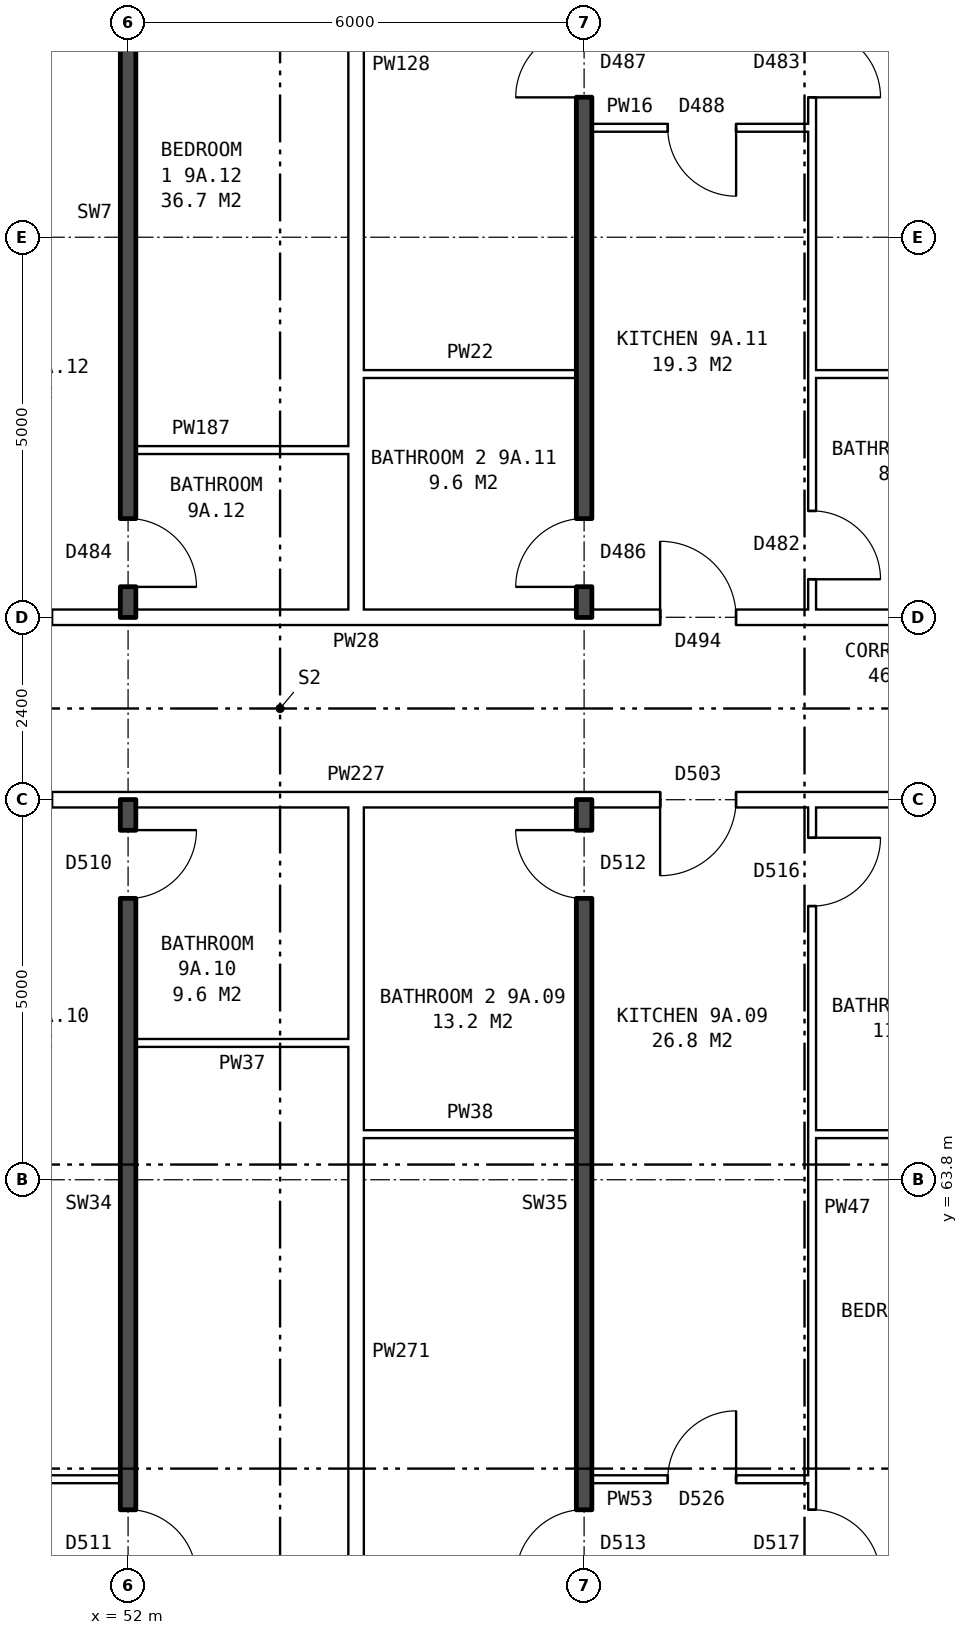
"""IFC4 building model, lengths in metres.
Left out: names, types, materials, properties, quantities, classifications, styles, units other than length and angle.
Written with IfcOpenShell. Run it as: python <this file> out.ifc"""

import sys

from ifc_helpers import new_model, si_unit, direction, frame, frame_2d, origin, place, context, subcontext, project, spatial, rectangle, extrude, element, fill, save


model = new_model("IFC4")
c1 = context("Model", 3, precision=1e-05, world=origin(), true_north=direction((0.0, 1.0)))
c2 = subcontext(c1, "Body", "Model", "MODEL_VIEW")
j1 = project(units=[si_unit("LENGTHUNIT", "METRE"), si_unit("PLANEANGLEUNIT", "RADIAN")], contexts=[c1])
p1 = place(None, origin())
s1 = spatial("IfcSite", under=j1, at=p1, CompositionType="ELEMENT")
p2 = place(p1, origin())
s2 = spatial("IfcBuilding", under=s1, at=p2, CompositionType="ELEMENT")
p3 = place(p2, frame((0.0, 0.0, 35.0)))
s3 = spatial("IfcBuildingStorey", under=s2, at=p3, CompositionType="ELEMENT", Elevation=35.0)
p4 = place(p3, frame((49.0, 59.86, 0.0), z_axis=(0.0, 0.0, 1.0), x_axis=(1.0, 0.0, 0.0)))
e1 = element("IfcWall", 1, at=p4, inside=s3, PredefinedType="PARTITIONING", context=c2, shape_type="SweptSolid", body=[
    extrude(rectangle(XDim=2.9, YDim=0.1, at=frame_2d((1.45, 0.0))), origin(), (0.0, 0.0, 1.0), 2.85),
])
p5 = place(p4, frame((1.0, 0.0, 0.0)))
e2 = element("IfcOpeningElement", 2, at=p5, cuts=e1, PredefinedType="OPENING", context=c2, shape_type="SweptSolid", body=[
    extrude(rectangle(XDim=0.9, YDim=2.1, at=frame_2d((0.45, 1.05))), frame((0.0, 0.06, 0.0), z_axis=(0.0, -1.0, 0.0), x_axis=(1.0, 0.0, 0.0)), (0.0, 0.0, 1.0), 0.12),
])
p6 = place(p3, frame((58.1, 59.86, 0.0), z_axis=(0.0, 0.0, 1.0), x_axis=(1.0, 0.0, 0.0)))
e3 = element("IfcWall", 3, at=p6, inside=s3, PredefinedType="PARTITIONING", context=c2, shape_type="SweptSolid", body=[
    extrude(rectangle(XDim=2.9, YDim=0.1, at=frame_2d((1.45, 0.0))), origin(), (0.0, 0.0, 1.0), 2.85),
])
p7 = place(p6, frame((1.0, 0.0, 0.0)))
e4 = element("IfcOpeningElement", 4, at=p7, cuts=e3, PredefinedType="OPENING", context=c2, shape_type="SweptSolid", body=[
    extrude(rectangle(XDim=0.9, YDim=2.1, at=frame_2d((0.45, 1.05))), frame((0.0, 0.06, 0.0), z_axis=(0.0, -1.0, 0.0), x_axis=(1.0, 0.0, 0.0)), (0.0, 0.0, 1.0), 0.12),
])
p8 = place(p3, frame((55.1, 64.4, 0.0), z_axis=(0.0, 0.0, 1.0), x_axis=(1.0, 0.0, 0.0)))
e5 = element("IfcWall", 5, at=p8, inside=s3, PredefinedType="PARTITIONING", context=c2, shape_type="SweptSolid", body=[
    extrude(rectangle(XDim=2.8, YDim=0.1, at=frame_2d((1.4, 0.0))), origin(), (0.0, 0.0, 1.0), 2.85),
])
p9 = place(p3, frame((61.0, 64.4, 0.0), z_axis=(0.0, 0.0, 1.0), x_axis=(1.0, 0.0, 0.0)))
e6 = element("IfcWall", 6, at=p9, inside=s3, PredefinedType="PARTITIONING", context=c2, shape_type="SweptSolid", body=[
    extrude(rectangle(XDim=2.64, YDim=0.1, at=frame_2d((1.32, 0.0))), origin(), (0.0, 0.0, 1.0), 2.85),
])
p10 = place(p3, frame((52.1, 65.6, 0.0), z_axis=(0.0, 0.0, 1.0), x_axis=(1.0, 0.0, 0.0)))
e7 = element("IfcWall", 7, at=p10, inside=s3, PredefinedType="PARTITIONING", context=c2, shape_type="SweptSolid", body=[
    extrude(rectangle(XDim=2.8, YDim=0.1, at=frame_2d((1.4, 0.0))), origin(), (0.0, 0.0, 1.0), 2.85),
])
p11 = place(p3, frame((44.36, 68.8, 0.0), z_axis=(0.0, 0.0, 1.0), x_axis=(1.0, 0.0, 0.0)))
e8 = element("IfcWall", 8, at=p11, inside=s3, PredefinedType="PARTITIONING", context=c2, shape_type="SweptSolid", body=[
    extrude(rectangle(XDim=19.28, YDim=0.2, at=frame_2d((9.64, 0.0))), origin(), (0.0, 0.0, 1.0), 2.85),
])
p12 = place(p11, frame((14.64, 0.0, 0.0)))
e9 = element("IfcOpeningElement", 9, at=p12, cuts=e8, PredefinedType="OPENING", context=c2, shape_type="SweptSolid", body=[
    extrude(rectangle(XDim=1.0, YDim=2.1, at=frame_2d((0.5, 1.05))), frame((0.0, 0.11, 0.0), z_axis=(0.0, -1.0, 0.0), x_axis=(1.0, 0.0, 0.0)), (0.0, 0.0, 1.0), 0.22),
])
p13 = place(p11, frame((5.64, 0.0, 0.0)))
e10 = element("IfcOpeningElement", 10, at=p13, cuts=e8, PredefinedType="OPENING", context=c2, shape_type="SweptSolid", body=[
    extrude(rectangle(XDim=1.0, YDim=2.1, at=frame_2d((0.5, 1.05))), frame((0.0, 0.11, 0.0), z_axis=(0.0, -1.0, 0.0), x_axis=(1.0, 0.0, 0.0)), (0.0, 0.0, 1.0), 0.22),
])
p14 = place(p3, frame((44.36, 71.2, 0.0), z_axis=(0.0, 0.0, 1.0), x_axis=(1.0, 0.0, 0.0)))
e11 = element("IfcWall", 11, at=p14, inside=s3, PredefinedType="PARTITIONING", context=c2, shape_type="SweptSolid", body=[
    extrude(rectangle(XDim=19.28, YDim=0.2, at=frame_2d((9.64, 0.0))), origin(), (0.0, 0.0, 1.0), 2.85),
])
p15 = place(p14, frame((14.64, 0.0, 0.0)))
e12 = element("IfcOpeningElement", 12, at=p15, cuts=e11, PredefinedType="OPENING", context=c2, shape_type="SweptSolid", body=[
    extrude(rectangle(XDim=1.0, YDim=2.1, at=frame_2d((0.5, 1.05))), frame((0.0, 0.11, 0.0), z_axis=(0.0, -1.0, 0.0), x_axis=(1.0, 0.0, 0.0)), (0.0, 0.0, 1.0), 0.22),
])
p16 = place(p14, frame((5.64, 0.0, 0.0)))
e13 = element("IfcOpeningElement", 13, at=p16, cuts=e11, PredefinedType="OPENING", context=c2, shape_type="SweptSolid", body=[
    extrude(rectangle(XDim=1.0, YDim=2.1, at=frame_2d((0.5, 1.05))), frame((0.0, 0.11, 0.0), z_axis=(0.0, -1.0, 0.0), x_axis=(1.0, 0.0, 0.0)), (0.0, 0.0, 1.0), 0.22),
])
for number, where, z_axis, x_axis in (
    (14, (52.1, 73.4, 0.0), (0.0, 0.0, 1.0), (1.0, 0.0, 0.0)),
    (15, (55.1, 74.4, 0.0), (0.0, 0.0, 1.0), (1.0, 0.0, 0.0)),
):
    element("IfcWall", number, at=place(p3, frame(where, z_axis=z_axis, x_axis=x_axis)), inside=s3, PredefinedType="PARTITIONING", context=c2, shape_type="SweptSolid", body=[
        extrude(rectangle(XDim=2.8, YDim=0.1, at=frame_2d((1.4, 0.0))), origin(), (0.0, 0.0, 1.0), 2.85),
    ])
p17 = place(p3, frame((61.0, 74.4, 0.0), z_axis=(0.0, 0.0, 1.0), x_axis=(1.0, 0.0, 0.0)))
e16 = element("IfcWall", 16, at=p17, inside=s3, PredefinedType="PARTITIONING", context=c2, shape_type="SweptSolid", body=[
    extrude(rectangle(XDim=2.64, YDim=0.1, at=frame_2d((1.32, 0.0))), origin(), (0.0, 0.0, 1.0), 2.85),
])
p18 = place(p3, frame((58.1, 77.64, 0.0), z_axis=(0.0, 0.0, 1.0), x_axis=(1.0, 0.0, 0.0)))
e17 = element("IfcWall", 17, at=p18, inside=s3, PredefinedType="PARTITIONING", context=c2, shape_type="SweptSolid", body=[
    extrude(rectangle(XDim=2.9, YDim=0.1, at=frame_2d((1.45, 0.0))), origin(), (0.0, 0.0, 1.0), 2.85),
])
p19 = place(p18, frame((1.0, 0.0, 0.0)))
e18 = element("IfcOpeningElement", 18, at=p19, cuts=e17, PredefinedType="OPENING", context=c2, shape_type="SweptSolid", body=[
    extrude(rectangle(XDim=0.9, YDim=2.1, at=frame_2d((0.45, 1.05))), frame((0.0, 0.06, 0.0), z_axis=(0.0, -1.0, 0.0), x_axis=(1.0, 0.0, 0.0)), (0.0, 0.0, 1.0), 0.12),
])
p20 = place(p3, frame((52.0, 54.36, 0.0), z_axis=(0.0, 0.0, 1.0), x_axis=(0.0, 1.0, 0.0)))
e19 = element("IfcWall", 19, at=p20, inside=s3, PredefinedType="SOLIDWALL", context=c2, shape_type="SweptSolid", body=[
    extrude(rectangle(XDim=14.44, YDim=0.2, at=frame_2d((7.22, 0.0))), origin(), (0.0, 0.0, 1.0), 2.85),
])
p21 = place(p20, frame((4.2, 0.0, 0.0)))
e20 = element("IfcOpeningElement", 20, at=p21, cuts=e19, PredefinedType="OPENING", context=c2, shape_type="SweptSolid", body=[
    extrude(rectangle(XDim=0.9, YDim=2.1, at=frame_2d((0.45, 1.05))), frame((0.0, 0.11, 0.0), z_axis=(0.0, -1.0, 0.0), x_axis=(1.0, 0.0, 0.0)), (0.0, 0.0, 1.0), 0.22),
])
p22 = place(p20, frame((13.14, 0.0, 0.0)))
e21 = element("IfcOpeningElement", 21, at=p22, cuts=e19, PredefinedType="OPENING", context=c2, shape_type="SweptSolid", body=[
    extrude(rectangle(XDim=0.9, YDim=2.1, at=frame_2d((0.45, 1.05))), frame((0.0, 0.11, 0.0), z_axis=(0.0, -1.0, 0.0), x_axis=(1.0, 0.0, 0.0)), (0.0, 0.0, 1.0), 0.22),
])
p23 = place(p3, frame((52.0, 71.2, 0.0), z_axis=(0.0, 0.0, 1.0), x_axis=(0.0, 1.0, 0.0)))
e22 = element("IfcWall", 22, at=p23, inside=s3, PredefinedType="SOLIDWALL", context=c2, shape_type="SweptSolid", body=[
    extrude(rectangle(XDim=14.44, YDim=0.2, at=frame_2d((7.22, 0.0))), origin(), (0.0, 0.0, 1.0), 2.85),
])
p24 = place(p23, frame((9.34, 0.0, 0.0)))
e23 = element("IfcOpeningElement", 23, at=p24, cuts=e22, PredefinedType="OPENING", context=c2, shape_type="SweptSolid", body=[
    extrude(rectangle(XDim=0.9, YDim=2.1, at=frame_2d((0.45, 1.05))), frame((0.0, 0.11, 0.0), z_axis=(0.0, -1.0, 0.0), x_axis=(1.0, 0.0, 0.0)), (0.0, 0.0, 1.0), 0.22),
])
p25 = place(p23, frame((0.4, 0.0, 0.0)))
e24 = element("IfcOpeningElement", 24, at=p25, cuts=e22, PredefinedType="OPENING", context=c2, shape_type="SweptSolid", body=[
    extrude(rectangle(XDim=0.9, YDim=2.1, at=frame_2d((0.45, 1.05))), frame((0.0, 0.11, 0.0), z_axis=(0.0, -1.0, 0.0), x_axis=(1.0, 0.0, 0.0)), (0.0, 0.0, 1.0), 0.22),
])
for number, where, z_axis, x_axis in (
    (25, (55.0, 54.36, 0.0), (0.0, 0.0, 1.0), (0.0, 1.0, 0.0)),
    (26, (55.0, 71.3, 0.0), (0.0, 0.0, 1.0), (0.0, 1.0, 0.0)),
):
    element("IfcWall", number, at=place(p3, frame(where, z_axis=z_axis, x_axis=x_axis)), inside=s3, PredefinedType="PARTITIONING", context=c2, shape_type="SweptSolid", body=[
        extrude(rectangle(XDim=14.34, YDim=0.2, at=frame_2d((7.17, 0.0))), origin(), (0.0, 0.0, 1.0), 2.85),
    ])
p26 = place(p3, frame((58.0, 54.36, 0.0), z_axis=(0.0, 0.0, 1.0), x_axis=(0.0, 1.0, 0.0)))
e27 = element("IfcWall", 27, at=p26, inside=s3, PredefinedType="SOLIDWALL", context=c2, shape_type="SweptSolid", body=[
    extrude(rectangle(XDim=14.44, YDim=0.2, at=frame_2d((7.22, 0.0))), origin(), (0.0, 0.0, 1.0), 2.85),
])
p27 = place(p26, frame((4.2, 0.0, 0.0)))
e28 = element("IfcOpeningElement", 28, at=p27, cuts=e27, PredefinedType="OPENING", context=c2, shape_type="SweptSolid", body=[
    extrude(rectangle(XDim=0.9, YDim=2.1, at=frame_2d((0.45, 1.05))), frame((0.0, 0.11, 0.0), z_axis=(0.0, -1.0, 0.0), x_axis=(1.0, 0.0, 0.0)), (0.0, 0.0, 1.0), 0.22),
])
p28 = place(p26, frame((13.14, 0.0, 0.0)))
e29 = element("IfcOpeningElement", 29, at=p28, cuts=e27, PredefinedType="OPENING", context=c2, shape_type="SweptSolid", body=[
    extrude(rectangle(XDim=0.9, YDim=2.1, at=frame_2d((0.45, 1.05))), frame((0.0, 0.11, 0.0), z_axis=(0.0, -1.0, 0.0), x_axis=(1.0, 0.0, 0.0)), (0.0, 0.0, 1.0), 0.22),
])
p29 = place(p3, frame((58.0, 71.2, 0.0), z_axis=(0.0, 0.0, 1.0), x_axis=(0.0, 1.0, 0.0)))
e30 = element("IfcWall", 30, at=p29, inside=s3, PredefinedType="SOLIDWALL", context=c2, shape_type="SweptSolid", body=[
    extrude(rectangle(XDim=14.44, YDim=0.2, at=frame_2d((7.22, 0.0))), origin(), (0.0, 0.0, 1.0), 2.85),
])
p30 = place(p29, frame((6.84, 0.0, 0.0)))
e31 = element("IfcOpeningElement", 31, at=p30, cuts=e30, PredefinedType="OPENING", context=c2, shape_type="SweptSolid", body=[
    extrude(rectangle(XDim=0.9, YDim=2.1, at=frame_2d((0.45, 1.05))), frame((0.0, 0.11, 0.0), z_axis=(0.0, -1.0, 0.0), x_axis=(1.0, 0.0, 0.0)), (0.0, 0.0, 1.0), 0.22),
])
p31 = place(p29, frame((0.4, 0.0, 0.0)))
e32 = element("IfcOpeningElement", 32, at=p31, cuts=e30, PredefinedType="OPENING", context=c2, shape_type="SweptSolid", body=[
    extrude(rectangle(XDim=0.9, YDim=2.1, at=frame_2d((0.45, 1.05))), frame((0.0, 0.11, 0.0), z_axis=(0.0, -1.0, 0.0), x_axis=(1.0, 0.0, 0.0)), (0.0, 0.0, 1.0), 0.22),
])
p32 = place(p3, frame((61.0, 54.36, 0.0), z_axis=(0.0, 0.0, 1.0), x_axis=(0.0, 1.0, 0.0)))
e33 = element("IfcWall", 33, at=p32, inside=s3, PredefinedType="PARTITIONING", context=c2, shape_type="SweptSolid", body=[
    extrude(rectangle(XDim=14.34, YDim=0.1, at=frame_2d((7.17, 0.0))), origin(), (0.0, 0.0, 1.0), 2.85),
])
p33 = place(p32, frame((4.2, 0.0, 0.0)))
e34 = element("IfcOpeningElement", 34, at=p33, cuts=e33, PredefinedType="OPENING", context=c2, shape_type="SweptSolid", body=[
    extrude(rectangle(XDim=0.9, YDim=2.1, at=frame_2d((0.45, 1.05))), frame((0.0, 0.06, 0.0), z_axis=(0.0, -1.0, 0.0), x_axis=(1.0, 0.0, 0.0)), (0.0, 0.0, 1.0), 0.12),
])
p34 = place(p32, frame((13.04, 0.0, 0.0)))
e35 = element("IfcOpeningElement", 35, at=p34, cuts=e33, PredefinedType="OPENING", context=c2, shape_type="SweptSolid", body=[
    extrude(rectangle(XDim=0.9, YDim=2.1, at=frame_2d((0.45, 1.05))), frame((0.0, 0.06, 0.0), z_axis=(0.0, -1.0, 0.0), x_axis=(1.0, 0.0, 0.0)), (0.0, 0.0, 1.0), 0.12),
])
p35 = place(p3, frame((61.0, 71.3, 0.0), z_axis=(0.0, 0.0, 1.0), x_axis=(0.0, 1.0, 0.0)))
e36 = element("IfcWall", 36, at=p35, inside=s3, PredefinedType="PARTITIONING", context=c2, shape_type="SweptSolid", body=[
    extrude(rectangle(XDim=14.34, YDim=0.1, at=frame_2d((7.17, 0.0))), origin(), (0.0, 0.0, 1.0), 2.85),
])
p36 = place(p35, frame((6.74, 0.0, 0.0)))
e37 = element("IfcOpeningElement", 37, at=p36, cuts=e36, PredefinedType="OPENING", context=c2, shape_type="SweptSolid", body=[
    extrude(rectangle(XDim=0.9, YDim=2.1, at=frame_2d((0.45, 1.05))), frame((0.0, 0.06, 0.0), z_axis=(0.0, -1.0, 0.0), x_axis=(1.0, 0.0, 0.0)), (0.0, 0.0, 1.0), 0.12),
])
p37 = place(p35, frame((0.4, 0.0, 0.0)))
e38 = element("IfcOpeningElement", 38, at=p37, cuts=e36, PredefinedType="OPENING", context=c2, shape_type="SweptSolid", body=[
    extrude(rectangle(XDim=0.9, YDim=2.1, at=frame_2d((0.45, 1.05))), frame((0.0, 0.06, 0.0), z_axis=(0.0, -1.0, 0.0), x_axis=(1.0, 0.0, 0.0)), (0.0, 0.0, 1.0), 0.12),
])
p38 = place(p33, frame((0.9, 0.0, 0.0), z_axis=(0.0, 0.0, 1.0), x_axis=(-1.0, 0.0, 0.0)))
e39 = element("IfcDoor", 39, at=p38, inside=s3, OperationType="SINGLE_SWING_RIGHT", PredefinedType="DOOR", context=c2, shape_type="SweptSolid", body=[
    extrude(rectangle(XDim=0.9, YDim=2.1, at=frame_2d((0.45, 1.05))), frame((0.0, 0.025, 0.0), z_axis=(0.0, -1.0, 0.0), x_axis=(1.0, 0.0, 0.0)), (0.0, 0.0, 1.0), 0.05),
])
fill(e34, e39)
p39 = place(p27, origin())
e40 = element("IfcDoor", 40, at=p39, inside=s3, OperationType="SINGLE_SWING_LEFT", PredefinedType="DOOR", context=c2, shape_type="SweptSolid", body=[
    extrude(rectangle(XDim=0.9, YDim=2.1, at=frame_2d((0.45, 1.05))), frame((0.0, 0.025, 0.0), z_axis=(0.0, -1.0, 0.0), x_axis=(1.0, 0.0, 0.0)), (0.0, 0.0, 1.0), 0.05),
])
fill(e28, e40)
p40 = place(p12, frame((1.0, 0.0, 0.0), z_axis=(0.0, 0.0, 1.0), x_axis=(-1.0, 0.0, 0.0)))
e41 = element("IfcDoor", 41, at=p40, inside=s3, OperationType="SINGLE_SWING_RIGHT", PredefinedType="DOOR", context=c2, shape_type="SweptSolid", body=[
    extrude(rectangle(XDim=1.0, YDim=2.1, at=frame_2d((0.5, 1.05))), frame((0.0, 0.025, 0.0), z_axis=(0.0, -1.0, 0.0), x_axis=(1.0, 0.0, 0.0)), (0.0, 0.0, 1.0), 0.05),
])
fill(e9, e41)
p41 = place(p7, origin())
e42 = element("IfcDoor", 42, at=p41, inside=s3, OperationType="SINGLE_SWING_RIGHT", PredefinedType="DOOR", context=c2, shape_type="SweptSolid", body=[
    extrude(rectangle(XDim=0.9, YDim=2.1, at=frame_2d((0.45, 1.05))), frame((0.0, 0.025, 0.0), z_axis=(0.0, -1.0, 0.0), x_axis=(1.0, 0.0, 0.0)), (0.0, 0.0, 1.0), 0.05),
])
fill(e4, e42)
p42 = place(p34, frame((0.9, 0.0, 0.0), z_axis=(0.0, 0.0, 1.0), x_axis=(-1.0, 0.0, 0.0)))
e43 = element("IfcDoor", 43, at=p42, inside=s3, OperationType="SINGLE_SWING_LEFT", PredefinedType="DOOR", context=c2, shape_type="SweptSolid", body=[
    extrude(rectangle(XDim=0.9, YDim=2.1, at=frame_2d((0.45, 1.05))), frame((0.0, 0.025, 0.0), z_axis=(0.0, -1.0, 0.0), x_axis=(1.0, 0.0, 0.0)), (0.0, 0.0, 1.0), 0.05),
])
fill(e35, e43)
p43 = place(p28, origin())
e44 = element("IfcDoor", 44, at=p43, inside=s3, OperationType="SINGLE_SWING_RIGHT", PredefinedType="DOOR", context=c2, shape_type="SweptSolid", body=[
    extrude(rectangle(XDim=0.9, YDim=2.1, at=frame_2d((0.45, 1.05))), frame((0.0, 0.025, 0.0), z_axis=(0.0, -1.0, 0.0), x_axis=(1.0, 0.0, 0.0)), (0.0, 0.0, 1.0), 0.05),
])
fill(e29, e44)
p44 = place(p21, frame((0.9, 0.0, 0.0), z_axis=(0.0, 0.0, 1.0), x_axis=(-1.0, 0.0, 0.0)))
e45 = element("IfcDoor", 45, at=p44, inside=s3, OperationType="SINGLE_SWING_RIGHT", PredefinedType="DOOR", context=c2, shape_type="SweptSolid", body=[
    extrude(rectangle(XDim=0.9, YDim=2.1, at=frame_2d((0.45, 1.05))), frame((0.0, 0.025, 0.0), z_axis=(0.0, -1.0, 0.0), x_axis=(1.0, 0.0, 0.0)), (0.0, 0.0, 1.0), 0.05),
])
fill(e20, e45)
p45 = place(p22, frame((0.9, 0.0, 0.0), z_axis=(0.0, 0.0, 1.0), x_axis=(-1.0, 0.0, 0.0)))
e46 = element("IfcDoor", 46, at=p45, inside=s3, OperationType="SINGLE_SWING_LEFT", PredefinedType="DOOR", context=c2, shape_type="SweptSolid", body=[
    extrude(rectangle(XDim=0.9, YDim=2.1, at=frame_2d((0.45, 1.05))), frame((0.0, 0.025, 0.0), z_axis=(0.0, -1.0, 0.0), x_axis=(1.0, 0.0, 0.0)), (0.0, 0.0, 1.0), 0.05),
])
fill(e21, e46)
p46 = place(p36, frame((0.9, 0.0, 0.0), z_axis=(0.0, 0.0, 1.0), x_axis=(-1.0, 0.0, 0.0)))
e47 = element("IfcDoor", 47, at=p46, inside=s3, OperationType="SINGLE_SWING_RIGHT", PredefinedType="DOOR", context=c2, shape_type="SweptSolid", body=[
    extrude(rectangle(XDim=0.9, YDim=2.1, at=frame_2d((0.45, 1.05))), frame((0.0, 0.025, 0.0), z_axis=(0.0, -1.0, 0.0), x_axis=(1.0, 0.0, 0.0)), (0.0, 0.0, 1.0), 0.05),
])
fill(e37, e47)
p47 = place(p30, origin())
e48 = element("IfcDoor", 48, at=p47, inside=s3, OperationType="SINGLE_SWING_LEFT", PredefinedType="DOOR", context=c2, shape_type="SweptSolid", body=[
    extrude(rectangle(XDim=0.9, YDim=2.1, at=frame_2d((0.45, 1.05))), frame((0.0, 0.025, 0.0), z_axis=(0.0, -1.0, 0.0), x_axis=(1.0, 0.0, 0.0)), (0.0, 0.0, 1.0), 0.05),
])
fill(e31, e48)
p48 = place(p15, origin())
e49 = element("IfcDoor", 49, at=p48, inside=s3, OperationType="SINGLE_SWING_LEFT", PredefinedType="DOOR", context=c2, shape_type="SweptSolid", body=[
    extrude(rectangle(XDim=1.0, YDim=2.1, at=frame_2d((0.5, 1.05))), frame((0.0, 0.025, 0.0), z_axis=(0.0, -1.0, 0.0), x_axis=(1.0, 0.0, 0.0)), (0.0, 0.0, 1.0), 0.05),
])
fill(e12, e49)
p49 = place(p19, frame((0.9, 0.0, 0.0), z_axis=(0.0, 0.0, 1.0), x_axis=(-1.0, 0.0, 0.0)))
e50 = element("IfcDoor", 50, at=p49, inside=s3, OperationType="SINGLE_SWING_LEFT", PredefinedType="DOOR", context=c2, shape_type="SweptSolid", body=[
    extrude(rectangle(XDim=0.9, YDim=2.1, at=frame_2d((0.45, 1.05))), frame((0.0, 0.025, 0.0), z_axis=(0.0, -1.0, 0.0), x_axis=(1.0, 0.0, 0.0)), (0.0, 0.0, 1.0), 0.05),
])
fill(e18, e50)
p50 = place(p37, frame((0.9, 0.0, 0.0), z_axis=(0.0, 0.0, 1.0), x_axis=(-1.0, 0.0, 0.0)))
e51 = element("IfcDoor", 51, at=p50, inside=s3, OperationType="SINGLE_SWING_RIGHT", PredefinedType="DOOR", context=c2, shape_type="SweptSolid", body=[
    extrude(rectangle(XDim=0.9, YDim=2.1, at=frame_2d((0.45, 1.05))), frame((0.0, 0.025, 0.0), z_axis=(0.0, -1.0, 0.0), x_axis=(1.0, 0.0, 0.0)), (0.0, 0.0, 1.0), 0.05),
])
fill(e38, e51)
p51 = place(p31, origin())
e52 = element("IfcDoor", 52, at=p51, inside=s3, OperationType="SINGLE_SWING_LEFT", PredefinedType="DOOR", context=c2, shape_type="SweptSolid", body=[
    extrude(rectangle(XDim=0.9, YDim=2.1, at=frame_2d((0.45, 1.05))), frame((0.0, 0.025, 0.0), z_axis=(0.0, -1.0, 0.0), x_axis=(1.0, 0.0, 0.0)), (0.0, 0.0, 1.0), 0.05),
])
fill(e32, e52)
p52 = place(p25, frame((0.9, 0.0, 0.0), z_axis=(0.0, 0.0, 1.0), x_axis=(-1.0, 0.0, 0.0)))
e53 = element("IfcDoor", 53, at=p52, inside=s3, OperationType="SINGLE_SWING_RIGHT", PredefinedType="DOOR", context=c2, shape_type="SweptSolid", body=[
    extrude(rectangle(XDim=0.9, YDim=2.1, at=frame_2d((0.45, 1.05))), frame((0.0, 0.025, 0.0), z_axis=(0.0, -1.0, 0.0), x_axis=(1.0, 0.0, 0.0)), (0.0, 0.0, 1.0), 0.05),
])
fill(e24, e53)
save(model, sys.argv[1])
